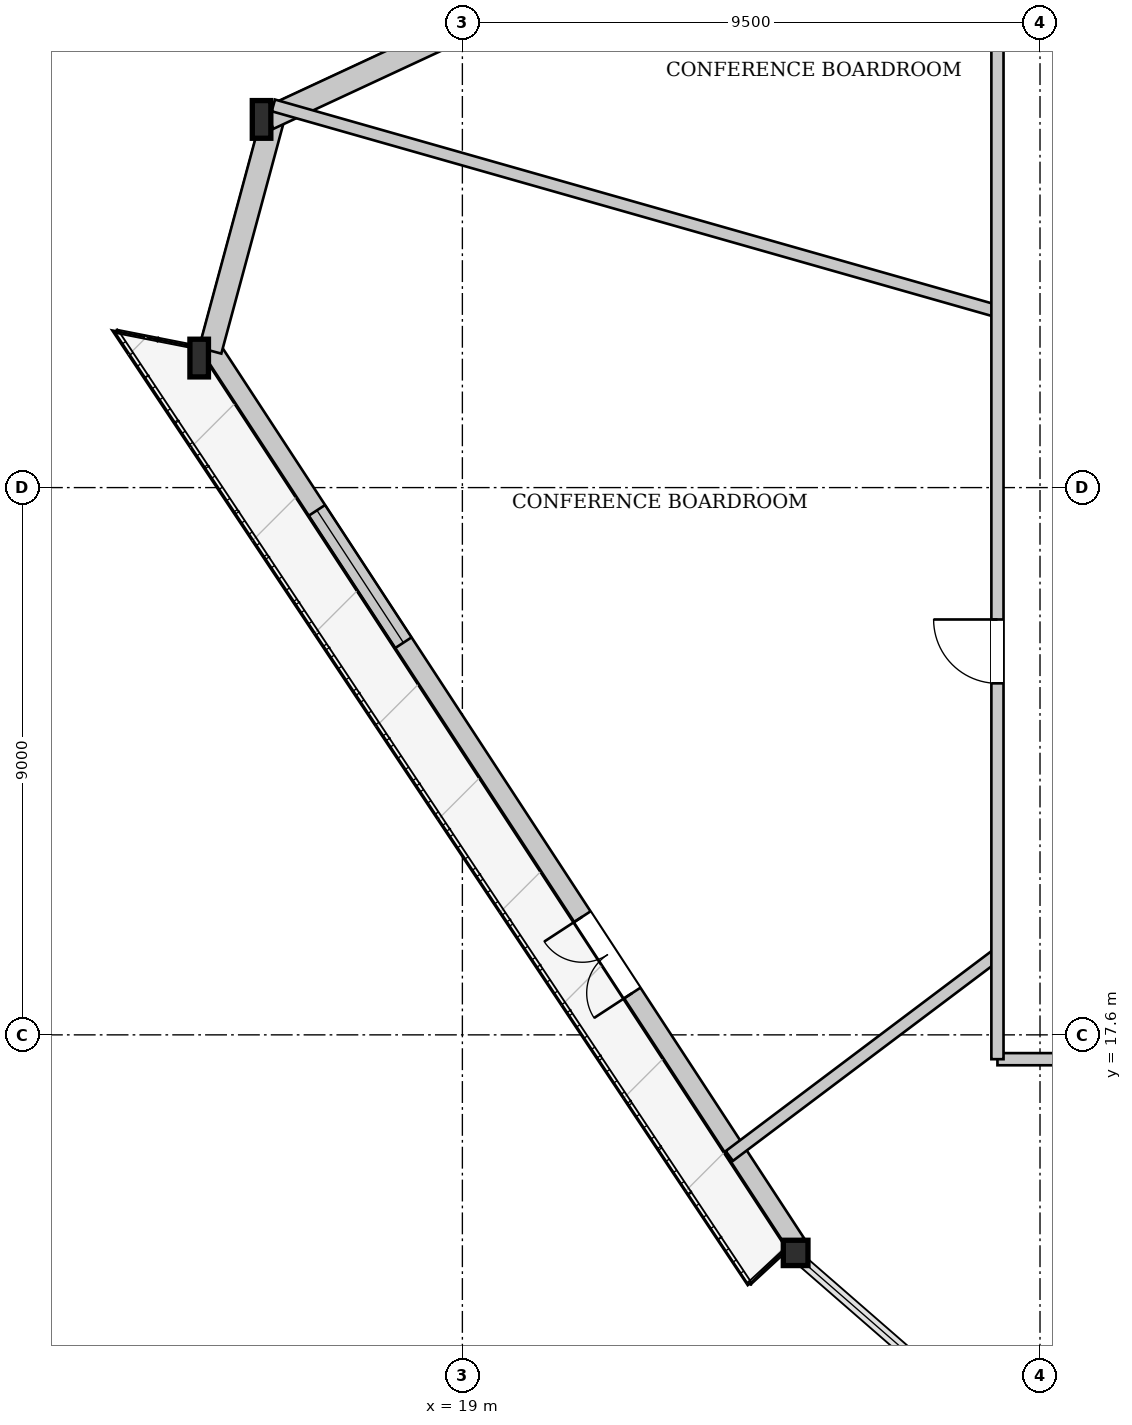
"""IFC4 building model, lengths in metres.
Left out: names, types, materials, properties, quantities, classifications, styles, units other than length and angle.
Written with IfcOpenShell. Run it as: python <this file> out.ifc"""

import sys

from ifc_helpers import new_model, si_unit, direction, frame, frame_2d, origin, origin_2d, place, context, subcontext, project, spatial, rectangle, i_section, extrude, source, transform, mapped, element, fill, save


model = new_model("IFC4")
c1 = context("Model", 3, precision=1e-05, world=origin(), true_north=direction((0.0, 1.0)))
c2 = subcontext(c1, "Body", "Model", "MODEL_VIEW")
j1 = project(units=[si_unit("LENGTHUNIT", "METRE"), si_unit("PLANEANGLEUNIT", "RADIAN")], contexts=[c1])
p1 = place(None, origin())
s1 = spatial("IfcSite", under=j1, at=p1, CompositionType="ELEMENT")
p2 = place(p1, origin())
s2 = spatial("IfcBuilding", under=s1, at=p2, CompositionType="ELEMENT")
p3 = place(p2, frame((0.0, 0.0, 209.6)))
s3 = spatial("IfcBuildingStorey", under=s2, at=p3, CompositionType="ELEMENT", Elevation=209.6)
m1 = source(origin(), c2, "Body", "SweptSolid", [
    extrude(i_section(OverallWidth=0.305, OverallDepth=0.62, WebThickness=0.021, FlangeThickness=0.04, at=origin_2d()), origin(), (0.0, 0.0, 1.0), 3.407),
])
p4 = place(p3, frame((15.732, 32.844, 0.0), z_axis=(-0.020494982912, -0.111289190426, 0.993576706535), x_axis=(0.983462094692, -0.181114075391, 0.0)))
e1 = element("IfcColumn", 1, at=p4, inside=s3, PredefinedType="COLUMN", context=c2, shape_type="MappedRepresentation", body=[
    mapped(m1, transform((0.0, 0.0, 0.0), x_axis=(1.0, 0.0, 0.0), y_axis=(0.0, 1.0, 0.0), z_axis=(0.0, 0.0, 1.0), scale=1.0)),
])
m2 = source(origin(), c2, "Body", "SweptSolid", [
    extrude(i_section(OverallWidth=0.305, OverallDepth=0.62, WebThickness=0.021, FlangeThickness=0.04, at=origin_2d()), origin(), (0.0, 0.0, 1.0), 3.402),
])
p5 = place(p3, frame((14.669, 28.902, 0.0), z_axis=(0.001650351111, -0.101101944141, 0.994874702278), x_axis=(0.99986679611, 0.016321459411, 0.0)))
e2 = element("IfcColumn", 2, at=p5, inside=s3, PredefinedType="COLUMN", context=c2, shape_type="MappedRepresentation", body=[
    mapped(m2, transform((0.0, 0.0, 0.0), x_axis=(1.0, 0.0, 0.0), y_axis=(0.0, 1.0, 0.0), z_axis=(0.0, 0.0, 1.0), scale=1.0)),
])
m3 = source(origin(), c2, "Body", "SweptSolid", [
    extrude(i_section(OverallWidth=0.406, OverallDepth=0.416, WebThickness=0.027, FlangeThickness=0.042, at=origin_2d()), origin(), (0.0, 0.0, 1.0), 3.399),
])
p6 = place(p3, frame((24.347, 14.088, 0.0), z_axis=(0.078726710001, -0.043745042327, 0.995935980073), x_axis=(0.485710646607, 0.874119653007, 0.0)))
e3 = element("IfcColumn", 3, at=p6, inside=s3, PredefinedType="COLUMN", context=c2, shape_type="MappedRepresentation", body=[
    mapped(m3, transform((0.0, 0.0, 0.0), x_axis=(1.0, 0.0, 0.0), y_axis=(0.0, 1.0, 0.0), z_axis=(0.0, 0.0, 1.0), scale=1.0)),
])
p7 = place(p3, frame((24.481, 14.176, 0.0), z_axis=(0.0, 0.0, 1.0), x_axis=(-0.546955288252, 0.837161819873, 0.0)))
e4 = element("IfcWall", 4, at=p7, inside=s3, PredefinedType="SOLIDWALL", context=c2, shape_type="SweptSolid", body=[
    extrude(rectangle(XDim=17.695, YDim=0.32, at=frame_2d((8.848, 0.0))), origin(), (0.0, 0.0, 1.0), 2.822),
])
p8 = place(p7, frame((4.912, 0.0, 0.0)))
e5 = element("IfcOpeningElement", 5, at=p8, cuts=e4, PredefinedType="OPENING", context=c2, shape_type="SweptSolid", body=[
    extrude(rectangle(XDim=1.5, YDim=2.3, at=frame_2d((0.75, 1.15))), frame((0.0, 0.17, 0.0), z_axis=(0.0, -1.0, 0.0), x_axis=(1.0, 0.0, 0.0)), (0.0, 0.0, 1.0), 0.34),
])
p9 = place(p7, frame((11.794, 0.0, 0.352)))
e6 = element("IfcOpeningElement", 6, at=p9, cuts=e4, PredefinedType="OPENING", context=c2, shape_type="SweptSolid", body=[
    extrude(rectangle(XDim=2.6, YDim=2.35, at=frame_2d((1.3, 1.175))), frame((0.0, 0.17, 0.0), z_axis=(0.0, -1.0, 0.0), x_axis=(1.0, 0.0, 0.0)), (0.0, 0.0, 1.0), 0.34),
])
p10 = place(p3, frame((14.852, 28.853, 0.0), z_axis=(0.0, 0.0, 1.0), x_axis=(0.26046020021, 0.965484585121, 0.0)))
e7 = element("IfcWall", 7, at=p10, inside=s3, PredefinedType="SOLIDWALL", context=c2, shape_type="SweptSolid", body=[
    extrude(rectangle(XDim=4.083, YDim=0.38, at=frame_2d((2.042, 0.0))), origin(), (0.0, 0.0, 1.0), 2.822),
])
p11 = place(p3, frame((15.812, 32.672, 0.0), z_axis=(0.0, 0.0, 1.0), x_axis=(0.906732766682, 0.421705691003, 0.0)))
e8 = element("IfcWall", 8, at=p11, inside=s3, PredefinedType="SOLIDWALL", context=c2, shape_type="SweptSolid", body=[
    extrude(rectangle(XDim=22.54, YDim=0.38, at=frame_2d((11.27, 0.0))), origin(), (0.0, 0.0, 1.0), 2.822),
])
p12 = place(p11, frame((5.711, 0.0, 0.65)))
e9 = element("IfcOpeningElement", 9, at=p12, cuts=e8, PredefinedType="OPENING", context=c2, shape_type="SweptSolid", body=[
    extrude(rectangle(XDim=1.2, YDim=1.5, at=frame_2d((0.6, 0.75))), frame((0.0, 0.2, 0.0), z_axis=(0.0, -1.0, 0.0), x_axis=(1.0, 0.0, 0.0)), (0.0, 0.0, 1.0), 0.4),
])
p13 = place(p11, frame((15.629, 0.0, 0.65)))
e10 = element("IfcOpeningElement", 10, at=p13, cuts=e8, PredefinedType="OPENING", context=c2, shape_type="SweptSolid", body=[
    extrude(rectangle(XDim=1.2, YDim=1.5, at=frame_2d((0.6, 0.75))), frame((0.0, 0.2, 0.0), z_axis=(0.0, -1.0, 0.0), x_axis=(1.0, 0.0, 0.0)), (0.0, 0.0, 1.0), 0.4),
])
p14 = place(p3, frame((27.8, 29.5, 0.0), z_axis=(0.0, 0.0, 1.0), x_axis=(-0.961890693006, 0.273434260306, 0.0)))
e11 = element("IfcWall", 11, at=p14, inside=s3, PredefinedType="PARTITIONING", context=c2, shape_type="SweptSolid", body=[
    extrude(rectangle(XDim=12.381, YDim=0.2, at=frame_2d((6.19, 0.0))), origin(), (0.0, 0.0, 1.0), 2.925),
])
p15 = place(p3, frame((27.8, 18.926, 0.0), z_axis=(0.0, 0.0, 1.0), x_axis=(-0.799112551023, -0.60118144582, 0.0)))
e12 = element("IfcWall", 12, at=p15, inside=s3, PredefinedType="PARTITIONING", context=c2, shape_type="SweptSolid", body=[
    extrude(rectangle(XDim=5.519, YDim=0.2, at=frame_2d((2.759, 0.0))), origin(), (0.0, 0.0, 1.0), 3.33),
])
p16 = place(p3, frame((27.8, 17.2, 0.0), z_axis=(0.0, 0.0, 1.0), x_axis=(1.0, 0.0, 0.0)))
e13 = element("IfcWall", 13, at=p16, inside=s3, PredefinedType="PARTITIONING", context=c2, shape_type="SweptSolid", body=[
    extrude(rectangle(XDim=20.4, YDim=0.2, at=frame_2d((10.2, 0.0))), origin(), (0.0, 0.0, 1.0), 3.33),
])
p17 = place(p16, frame((19.05, 0.0, 0.0)))
e14 = element("IfcOpeningElement", 14, at=p17, cuts=e13, PredefinedType="OPENING", context=c2, shape_type="SweptSolid", body=[
    extrude(rectangle(XDim=1.05, YDim=2.2, at=frame_2d((0.525, 1.1))), frame((0.0, 0.11, 0.0), z_axis=(0.0, -1.0, 0.0), x_axis=(1.0, 0.0, 0.0)), (0.0, 0.0, 1.0), 0.22),
])
p18 = place(p16, frame((6.236, 0.0, 0.0)))
e15 = element("IfcOpeningElement", 15, at=p18, cuts=e13, PredefinedType="OPENING", context=c2, shape_type="SweptSolid", body=[
    extrude(rectangle(XDim=1.05, YDim=2.2, at=frame_2d((0.525, 1.1))), frame((0.0, 0.11, 0.0), z_axis=(0.0, -1.0, 0.0), x_axis=(1.0, 0.0, 0.0)), (0.0, 0.0, 1.0), 0.22),
])
p19 = place(p16, frame((13.458, 0.0, 0.0)))
e16 = element("IfcOpeningElement", 16, at=p19, cuts=e13, PredefinedType="OPENING", context=c2, shape_type="SweptSolid", body=[
    extrude(rectangle(XDim=1.05, YDim=2.2, at=frame_2d((0.525, 1.1))), frame((0.0, 0.11, 0.0), z_axis=(0.0, -1.0, 0.0), x_axis=(1.0, 0.0, 0.0)), (0.0, 0.0, 1.0), 0.22),
])
p20 = place(p3, frame((27.8, 17.2, 0.0), z_axis=(0.0, 0.0, 1.0), x_axis=(0.0, 1.0, 0.0)))
e17 = element("IfcWall", 17, at=p20, inside=s3, PredefinedType="PARTITIONING", context=c2, shape_type="SweptSolid", body=[
    extrude(rectangle(XDim=18.8, YDim=0.2, at=frame_2d((9.4, 0.0))), origin(), (0.0, 0.0, 1.0), 3.33),
])
p21 = place(p20, frame((6.181, 0.0, 0.0)))
e18 = element("IfcOpeningElement", 18, at=p21, cuts=e17, PredefinedType="OPENING", context=c2, shape_type="SweptSolid", body=[
    extrude(rectangle(XDim=1.05, YDim=2.2, at=frame_2d((0.525, 1.1))), frame((0.0, 0.11, 0.0), z_axis=(0.0, -1.0, 0.0), x_axis=(1.0, 0.0, 0.0)), (0.0, 0.0, 1.0), 0.22),
])
m4 = source(origin(), c2, "Body", "SweptSolid", [
    extrude(rectangle(XDim=1.5, YDim=2.3, at=frame_2d((0.75, 1.15))), frame((0.0, 0.025, 0.0), z_axis=(0.0, -1.0, 0.0), x_axis=(1.0, 0.0, 0.0)), (0.0, 0.0, 1.0), 0.05),
])
p22 = place(p8, origin())
e19 = element("IfcDoor", 19, at=p22, inside=s3, OperationType="DOUBLE_DOOR_SINGLE_SWING", PredefinedType="DOOR", context=c2, shape_type="MappedRepresentation", body=[
    mapped(m4, transform((0.0, 0.0, 0.0), x_axis=(1.0, 0.0, 0.0), y_axis=(0.0, 1.0, 0.0), z_axis=(0.0, 0.0, 1.0), scale=1.0)),
])
fill(e5, e19)
m5 = source(origin(), c2, "Body", "SweptSolid", [
    extrude(rectangle(XDim=2.6, YDim=2.35, at=frame_2d((1.3, 1.175))), frame((0.0, 0.03, 0.0), z_axis=(0.0, -1.0, 0.0), x_axis=(1.0, 0.0, 0.0)), (0.0, 0.0, 1.0), 0.06),
])
p23 = place(p9, origin())
e20 = element("IfcWindow", 20, at=p23, inside=s3, PartitioningType="SINGLE_PANEL", PredefinedType="WINDOW", context=c2, shape_type="MappedRepresentation", body=[
    mapped(m5, transform((0.0, 0.0, 0.0), x_axis=(1.0, 0.0, 0.0), y_axis=(0.0, 1.0, 0.0), z_axis=(0.0, 0.0, 1.0), scale=1.0)),
])
fill(e6, e20)
m6 = source(origin(), c2, "Body", "SweptSolid", [
    extrude(rectangle(XDim=1.05, YDim=2.2, at=frame_2d((0.525, 1.1))), frame((0.0, 0.025, 0.0), z_axis=(0.0, -1.0, 0.0), x_axis=(1.0, 0.0, 0.0)), (0.0, 0.0, 1.0), 0.05),
])
p24 = place(p21, origin())
e21 = element("IfcDoor", 21, at=p24, inside=s3, OperationType="SINGLE_SWING_RIGHT", PredefinedType="DOOR", context=c2, shape_type="MappedRepresentation", body=[
    mapped(m6, transform((0.0, 0.0, 0.0), x_axis=(1.0, 0.0, 0.0), y_axis=(0.0, 1.0, 0.0), z_axis=(0.0, 0.0, 1.0), scale=1.0)),
])
fill(e18, e21)
save(model, sys.argv[1])
